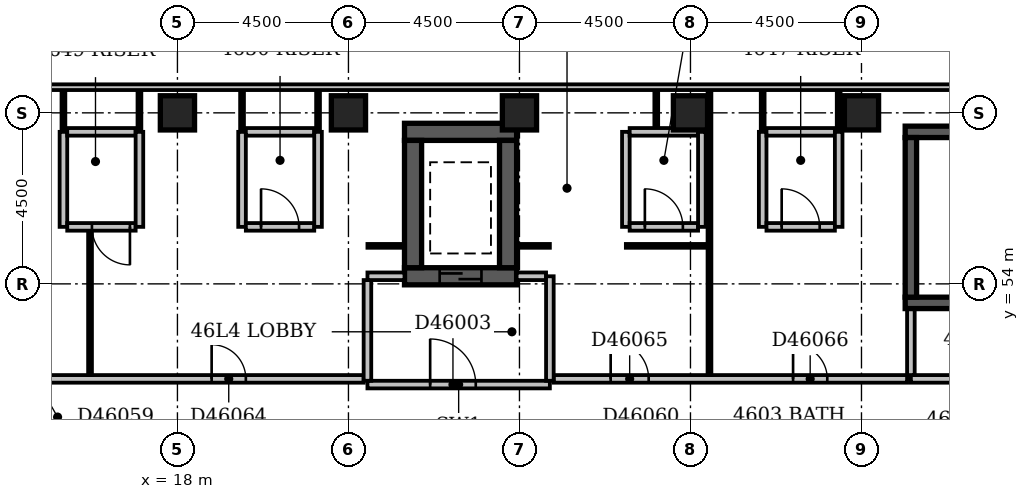
"""IFC4 building model, lengths in metres.
Left out: names, types, materials, properties, quantities, classifications, styles, units other than length and angle.
Written with IfcOpenShell. Run it as: python <this file> out.ifc"""

import sys

from ifc_helpers import new_model, si_unit, direction, frame, frame_2d, origin, origin_2d, place, context, subcontext, project, spatial, rectangle, extrude, element, fill, save


model = new_model("IFC4")
c1 = context("Model", 3, precision=1e-05, world=origin(), true_north=direction((0.0, 1.0)))
c2 = subcontext(c1, "Body", "Model", "MODEL_VIEW")
j1 = project(units=[si_unit("LENGTHUNIT", "METRE"), si_unit("PLANEANGLEUNIT", "RADIAN")], contexts=[c1])
p1 = place(None, origin())
s1 = spatial("IfcSite", under=j1, at=p1, CompositionType="ELEMENT")
p2 = place(p1, origin())
s2 = spatial("IfcBuilding", under=s1, at=p2, CompositionType="ELEMENT")
p3 = place(p2, frame((0.0, 0.0, 182.6)))
s3 = spatial("IfcBuildingStorey", under=s2, at=p3, CompositionType="ELEMENT", Elevation=182.6)
p4 = place(p3, frame((23.975, 54.2, -0.3), z_axis=(0.0, 0.0, 1.0), x_axis=(1.0, 0.0, 0.0)))
e1 = element("IfcWall", 1, at=p4, inside=s3, PredefinedType="SHEAR", context=c2, shape_type="SweptSolid", body=[
    extrude(rectangle(XDim=2.95, YDim=0.45, at=frame_2d((1.475, 0.0))), origin(), (0.0, 0.0, 1.0), 3.55),
])
p5 = place(p4, frame((0.925, 0.0, 0.3)))
e2 = element("IfcOpeningElement", 2, at=p5, cuts=e1, PredefinedType="OPENING", context=c2, shape_type="SweptSolid", body=[
    extrude(rectangle(XDim=1.1, YDim=2.1, at=frame_2d((0.55, 1.05))), frame((0.0, 0.237, 0.0), z_axis=(0.0, -1.0, 0.0), x_axis=(1.0, 0.0, 0.0)), (0.0, 0.0, 1.0), 0.474),
])
p6 = place(p3, frame((23.975, 58.0, -0.3), z_axis=(0.0, 0.0, 1.0), x_axis=(1.0, 0.0, 0.0)))
e3 = element("IfcWall", 3, at=p6, inside=s3, PredefinedType="SHEAR", context=c2, shape_type="SweptSolid", body=[
    extrude(rectangle(XDim=2.95, YDim=0.45, at=frame_2d((1.475, 0.0))), origin(), (0.0, 0.0, 1.0), 3.55),
])
for number, where, z_axis, x_axis in (
    (4, (24.2, 54.425, -0.3), (0.0, 0.0, 1.0), (0.0, 1.0, 0.0)),
    (5, (26.7, 54.425, -0.3), (0.0, 0.0, 1.0), (0.0, 1.0, 0.0)),
):
    element("IfcWall", number, at=place(p3, frame(where, z_axis=z_axis, x_axis=x_axis)), inside=s3, PredefinedType="SHEAR", context=c2, shape_type="SweptSolid", body=[
        extrude(rectangle(XDim=3.35, YDim=0.45, at=frame_2d((1.675, 0.0))), origin(), (0.0, 0.0, 1.0), 3.55),
    ])
p7 = place(p3, frame((37.15, 53.5, -0.3), z_axis=(0.0, 0.0, 1.0), x_axis=(1.0, 0.0, 0.0)))
e6 = element("IfcWall", 6, at=p7, inside=s3, PredefinedType="SHEAR", context=c2, shape_type="SweptSolid", body=[
    extrude(rectangle(XDim=7.0, YDim=0.3, at=frame_2d((3.5, 0.0))), origin(), (0.0, 0.0, 1.0), 3.55),
])
p8 = place(p7, frame((5.58, 0.0, 0.3)))
e7 = element("IfcOpeningElement", 7, at=p8, cuts=e6, PredefinedType="OPENING", context=c2, shape_type="SweptSolid", body=[
    extrude(rectangle(XDim=1.1, YDim=2.1, at=frame_2d((0.55, 1.05))), frame((0.0, 0.162, 0.0), z_axis=(0.0, -1.0, 0.0), x_axis=(1.0, 0.0, 0.0)), (0.0, 0.0, 1.0), 0.324),
])
p9 = place(p3, frame((37.15, 58.0, -0.3), z_axis=(0.0, 0.0, 1.0), x_axis=(1.0, 0.0, 0.0)))
e8 = element("IfcWall", 8, at=p9, inside=s3, PredefinedType="SHEAR", context=c2, shape_type="SweptSolid", body=[
    extrude(rectangle(XDim=7.4, YDim=0.3, at=frame_2d((3.7, 0.0))), origin(), (0.0, 0.0, 1.0), 3.55),
])
p10 = place(p3, frame((37.3, 53.65, -0.3), z_axis=(0.0, 0.0, 1.0), x_axis=(0.0, 1.0, 0.0)))
e9 = element("IfcWall", 9, at=p10, inside=s3, PredefinedType="SHEAR", context=c2, shape_type="SweptSolid", body=[
    extrude(rectangle(XDim=4.2, YDim=0.3, at=frame_2d((2.1, 0.0))), origin(), (0.0, 0.0, 1.0), 3.55),
])
for number, where, z_axis, x_axis in (
    (10, (18.0, 58.5, -0.3), (0.0, 0.0, 1.0), (1.0, 0.0, 0.0)),
    (11, (22.5, 58.5, -0.3), (0.0, 0.0, 1.0), (1.0, 0.0, 0.0)),
    (12, (27.0, 58.5, -0.3), (0.0, 0.0, 1.0), (1.0, 0.0, 0.0)),
    (13, (31.5, 58.5, -0.3), (0.0, 0.0, 1.0), (1.0, 0.0, 0.0)),
    (14, (36.0, 58.5, -0.3), (0.0, 0.0, 1.0), (1.0, 0.0, 0.0)),
):
    element("IfcColumn", number, at=place(p3, frame(where, z_axis=z_axis, x_axis=x_axis)), inside=s3, PredefinedType="COLUMN", context=c2, shape_type="SweptSolid", body=[
        extrude(rectangle(XDim=0.9, YDim=0.9, at=origin_2d()), origin(), (0.0, 0.0, 1.0), 3.55),
    ])
p11 = place(p3, frame((68.1, 59.175, 0.0), z_axis=(0.0, 0.0, 1.0), x_axis=(-1.0, 0.0, 0.0)))
e15 = element("IfcWall", 15, at=p11, inside=s3, PredefinedType="STANDARD", context=c2, shape_type="SweptSolid", body=[
    extrude(rectangle(XDim=68.85, YDim=0.15, at=frame_2d((34.425, 0.0))), origin(), (0.0, 0.0, 1.0), 2.7),
])
p12 = place(p3, frame((23.0, 51.35, 0.0), z_axis=(0.0, 0.0, 1.0), x_axis=(1.0, 0.0, 0.0)))
e16 = element("IfcWall", 16, at=p12, inside=s3, PredefinedType="PARTITIONING", context=c2, shape_type="SweptSolid", body=[
    extrude(rectangle(XDim=4.8, YDim=0.2, at=frame_2d((2.4, 0.0))), origin(), (0.0, 0.0, 1.0), 3.25),
])
p13 = place(p12, frame((1.65, 0.0, 0.0)))
e17 = element("IfcOpeningElement", 17, at=p13, cuts=e16, PredefinedType="OPENING", context=c2, shape_type="SweptSolid", body=[
    extrude(rectangle(XDim=1.2, YDim=2.1, at=frame_2d((0.6, 1.05))), frame((0.0, 0.112, 0.0), z_axis=(0.0, -1.0, 0.0), x_axis=(1.0, 0.0, 0.0)), (0.0, 0.0, 1.0), 0.224),
])
p14 = place(p3, frame((27.8, 51.45, 0.0), z_axis=(0.0, 0.0, 1.0), x_axis=(0.0, 1.0, 0.0)))
e18 = element("IfcWall", 18, at=p14, inside=s3, PredefinedType="PARTITIONING", context=c2, shape_type="SweptSolid", body=[
    extrude(rectangle(XDim=2.75, YDim=0.2, at=frame_2d((1.375, 0.0))), origin(), (0.0, 0.0, 1.0), 3.25),
])
p15 = place(p3, frame((23.0, 54.2, 0.0), z_axis=(0.0, 0.0, 1.0), x_axis=(1.0, 0.0, 0.0)))
e19 = element("IfcWall", 19, at=p15, inside=s3, PredefinedType="PARTITIONING", context=c2, shape_type="SweptSolid", body=[
    extrude(rectangle(XDim=0.975, YDim=0.2, at=frame_2d((0.488, 0.0))), origin(), (0.0, 0.0, 1.0), 3.25),
])
p16 = place(p3, frame((26.925, 54.2, 0.0), z_axis=(0.0, 0.0, 1.0), x_axis=(1.0, 0.0, 0.0)))
e20 = element("IfcWall", 20, at=p16, inside=s3, PredefinedType="PARTITIONING", context=c2, shape_type="SweptSolid", body=[
    extrude(rectangle(XDim=0.775, YDim=0.2, at=frame_2d((0.387, 0.0))), origin(), (0.0, 0.0, 1.0), 3.25),
])
p17 = place(p3, frame((23.0, 51.45, 0.0), z_axis=(0.0, 0.0, 1.0), x_axis=(0.0, 1.0, 0.0)))
e21 = element("IfcWall", 21, at=p17, inside=s3, PredefinedType="PARTITIONING", context=c2, shape_type="SweptSolid", body=[
    extrude(rectangle(XDim=2.65, YDim=0.2, at=frame_2d((1.325, 0.0))), origin(), (0.0, 0.0, 1.0), 3.25),
])
p18 = place(p3, frame((37.3, 51.5, 0.0), z_axis=(0.0, 0.0, 1.0), x_axis=(1.0, 0.0, 0.0)))
e22 = element("IfcWall", 22, at=p18, inside=s3, PredefinedType="PARTITIONING", context=c2, shape_type="SweptSolid", body=[
    extrude(rectangle(XDim=6.7, YDim=0.2, at=frame_2d((3.35, 0.0))), origin(), (0.0, 0.0, 1.0), 3.25),
])
p19 = place(p18, frame((2.75, 0.0, 0.0)))
e23 = element("IfcOpeningElement", 23, at=p19, cuts=e22, PredefinedType="OPENING", context=c2, shape_type="SweptSolid", body=[
    extrude(rectangle(XDim=1.2, YDim=2.1, at=frame_2d((0.6, 1.05))), frame((0.0, 0.112, 0.0), z_axis=(0.0, -1.0, 0.0), x_axis=(1.0, 0.0, 0.0)), (0.0, 0.0, 1.0), 0.224),
])
p20 = place(p3, frame((37.3, 51.6, 0.0), z_axis=(0.0, 0.0, 1.0), x_axis=(0.0, 1.0, 0.0)))
e24 = element("IfcWall", 24, at=p20, inside=s3, PredefinedType="PARTITIONING", context=c2, shape_type="SweptSolid", body=[
    extrude(rectangle(XDim=1.73, YDim=0.2, at=frame_2d((0.865, 0.0))), origin(), (0.0, 0.0, 1.0), 3.25),
])
p21 = place(p3, frame((7.6, 51.5, 0.0), z_axis=(0.0, 0.0, 1.0), x_axis=(1.0, 0.0, 0.0)))
e25 = element("IfcWall", 25, at=p21, inside=s3, PredefinedType="PARTITIONING", context=c2, shape_type="SweptSolid", body=[
    extrude(rectangle(XDim=15.3, YDim=0.2, at=frame_2d((7.65, 0.0))), origin(), (0.0, 0.0, 1.0), 3.25),
])
p22 = place(p21, frame((3.55, 0.0, 0.0)))
e26 = element("IfcOpeningElement", 26, at=p22, cuts=e25, PredefinedType="OPENING", context=c2, shape_type="SweptSolid", body=[
    extrude(rectangle(XDim=0.9, YDim=2.1, at=frame_2d((0.45, 1.05))), frame((0.0, 0.112, 0.0), z_axis=(0.0, -1.0, 0.0), x_axis=(1.0, 0.0, 0.0)), (0.0, 0.0, 1.0), 0.224),
])
p23 = place(p21, frame((11.3, 0.0, 0.0)))
e27 = element("IfcOpeningElement", 27, at=p23, cuts=e25, PredefinedType="OPENING", context=c2, shape_type="SweptSolid", body=[
    extrude(rectangle(XDim=0.9, YDim=2.1, at=frame_2d((0.45, 1.05))), frame((0.0, 0.112, 0.0), z_axis=(0.0, -1.0, 0.0), x_axis=(1.0, 0.0, 0.0)), (0.0, 0.0, 1.0), 0.224),
])
p24 = place(p3, frame((27.9, 51.5, 0.0), z_axis=(0.0, 0.0, 1.0), x_axis=(1.0, 0.0, 0.0)))
e28 = element("IfcWall", 28, at=p24, inside=s3, PredefinedType="PARTITIONING", context=c2, shape_type="SweptSolid", body=[
    extrude(rectangle(XDim=9.3, YDim=0.2, at=frame_2d((4.65, 0.0))), origin(), (0.0, 0.0, 1.0), 3.25),
])
p25 = place(p24, frame((1.5, 0.0, 0.0)))
e29 = element("IfcOpeningElement", 29, at=p25, cuts=e28, PredefinedType="OPENING", context=c2, shape_type="SweptSolid", body=[
    extrude(rectangle(XDim=1.0, YDim=2.1, at=frame_2d((0.5, 1.05))), frame((0.0, 0.112, 0.0), z_axis=(0.0, -1.0, 0.0), x_axis=(1.0, 0.0, 0.0)), (0.0, 0.0, 1.0), 0.224),
])
p26 = place(p24, frame((6.3, 0.0, 0.0)))
e30 = element("IfcOpeningElement", 30, at=p26, cuts=e28, PredefinedType="OPENING", context=c2, shape_type="SweptSolid", body=[
    extrude(rectangle(XDim=0.9, YDim=2.1, at=frame_2d((0.45, 1.05))), frame((0.0, 0.112, 0.0), z_axis=(0.0, -1.0, 0.0), x_axis=(1.0, 0.0, 0.0)), (0.0, 0.0, 1.0), 0.224),
])
p27 = place(p3, frame((15.7, 51.6, 0.0), z_axis=(0.0, 0.0, 1.0), x_axis=(0.0, 1.0, 0.0)))
e31 = element("IfcWall", 31, at=p27, inside=s3, PredefinedType="PARTITIONING", context=c2, shape_type="SweptSolid", body=[
    extrude(rectangle(XDim=3.8, YDim=0.1, at=frame_2d((1.9, 0.0))), origin(), (0.0, 0.0, 1.0), 3.25),
])
p28 = place(p3, frame((32.0, 51.6, 0.0), z_axis=(0.0, 0.0, 1.0), x_axis=(0.0, 1.0, 0.0)))
e32 = element("IfcWall", 32, at=p28, inside=s3, PredefinedType="PARTITIONING", context=c2, shape_type="SweptSolid", body=[
    extrude(rectangle(XDim=7.5, YDim=0.1, at=frame_2d((3.75, 0.0))), origin(), (0.0, 0.0, 1.0), 3.25),
])
p29 = place(p3, frame((23.0, 55.0, 0.0), z_axis=(0.0, 0.0, 1.0), x_axis=(1.0, 0.0, 0.0)))
e33 = element("IfcWall", 33, at=p29, inside=s3, PredefinedType="PARTITIONING", context=c2, shape_type="SweptSolid", body=[
    extrude(rectangle(XDim=0.975, YDim=0.1, at=frame_2d((0.488, 0.0))), origin(), (0.0, 0.0, 1.0), 3.25),
])
p30 = place(p3, frame((26.925, 55.0, 0.0), z_axis=(0.0, 0.0, 1.0), x_axis=(1.0, 0.0, 0.0)))
e34 = element("IfcWall", 34, at=p30, inside=s3, PredefinedType="PARTITIONING", context=c2, shape_type="SweptSolid", body=[
    extrude(rectangle(XDim=0.875, YDim=0.1, at=frame_2d((0.438, 0.0))), origin(), (0.0, 0.0, 1.0), 3.25),
])
p31 = place(p3, frame((29.8, 55.0, 0.0), z_axis=(0.0, 0.0, 1.0), x_axis=(1.0, 0.0, 0.0)))
e35 = element("IfcWall", 35, at=p31, inside=s3, PredefinedType="PARTITIONING", context=c2, shape_type="SweptSolid", body=[
    extrude(rectangle(XDim=2.15, YDim=0.1, at=frame_2d((1.075, 0.0))), origin(), (0.0, 0.0, 1.0), 3.25),
])
p32 = place(p3, frame((15.0, 55.5, 0.0), z_axis=(0.0, 0.0, 1.0), x_axis=(0.0, 1.0, 0.0)))
e36 = element("IfcWall", 36, at=p32, inside=s3, PredefinedType="PARTITIONING", context=c2, shape_type="SweptSolid", body=[
    extrude(rectangle(XDim=2.5, YDim=0.2, at=frame_2d((1.25, 0.0))), origin(), (0.0, 0.0, 1.0), 3.25),
])
p33 = place(p3, frame((15.1, 55.5, 0.0), z_axis=(0.0, 0.0, 1.0), x_axis=(1.0, 0.0, 0.0)))
e37 = element("IfcWall", 37, at=p33, inside=s3, PredefinedType="PARTITIONING", context=c2, shape_type="SweptSolid", body=[
    extrude(rectangle(XDim=1.8, YDim=0.2, at=frame_2d((0.9, 0.0))), origin(), (0.0, 0.0, 1.0), 3.25),
])
p34 = place(p33, frame((0.65, 0.0, 0.0)))
e38 = element("IfcOpeningElement", 38, at=p34, cuts=e37, PredefinedType="OPENING", context=c2, shape_type="SweptSolid", body=[
    extrude(rectangle(XDim=1.0, YDim=2.1, at=frame_2d((0.5, 1.05))), frame((0.0, 0.112, 0.0), z_axis=(0.0, -1.0, 0.0), x_axis=(1.0, 0.0, 0.0)), (0.0, 0.0, 1.0), 0.224),
])
for number, where, z_axis, x_axis in (
    (39, (17.0, 55.5, 0.0), (0.0, 0.0, 1.0), (0.0, 1.0, 0.0)),
    (40, (19.7, 55.5, 0.0), (0.0, 0.0, 1.0), (0.0, 1.0, 0.0)),
):
    element("IfcWall", number, at=place(p3, frame(where, z_axis=z_axis, x_axis=x_axis)), inside=s3, PredefinedType="PARTITIONING", context=c2, shape_type="SweptSolid", body=[
        extrude(rectangle(XDim=2.5, YDim=0.2, at=frame_2d((1.25, 0.0))), origin(), (0.0, 0.0, 1.0), 3.25),
    ])
p35 = place(p3, frame((19.8, 55.5, 0.0), z_axis=(0.0, 0.0, 1.0), x_axis=(1.0, 0.0, 0.0)))
e41 = element("IfcWall", 41, at=p35, inside=s3, PredefinedType="PARTITIONING", context=c2, shape_type="SweptSolid", body=[
    extrude(rectangle(XDim=1.8, YDim=0.2, at=frame_2d((0.9, 0.0))), origin(), (0.0, 0.0, 1.0), 3.25),
])
p36 = place(p35, frame((0.4, 0.0, 0.0)))
e42 = element("IfcOpeningElement", 42, at=p36, cuts=e41, PredefinedType="OPENING", context=c2, shape_type="SweptSolid", body=[
    extrude(rectangle(XDim=1.0, YDim=2.1, at=frame_2d((0.5, 1.05))), frame((0.0, 0.112, 0.0), z_axis=(0.0, -1.0, 0.0), x_axis=(1.0, 0.0, 0.0)), (0.0, 0.0, 1.0), 0.224),
])
for number, where, z_axis, x_axis in (
    (43, (21.7, 55.5, 0.0), (0.0, 0.0, 1.0), (0.0, 1.0, 0.0)),
    (44, (29.8, 55.5, 0.0), (0.0, 0.0, 1.0), (0.0, 1.0, 0.0)),
):
    element("IfcWall", number, at=place(p3, frame(where, z_axis=z_axis, x_axis=x_axis)), inside=s3, PredefinedType="PARTITIONING", context=c2, shape_type="SweptSolid", body=[
        extrude(rectangle(XDim=2.5, YDim=0.2, at=frame_2d((1.25, 0.0))), origin(), (0.0, 0.0, 1.0), 3.25),
    ])
p37 = place(p3, frame((29.9, 55.5, 0.0), z_axis=(0.0, 0.0, 1.0), x_axis=(1.0, 0.0, 0.0)))
e45 = element("IfcWall", 45, at=p37, inside=s3, PredefinedType="PARTITIONING", context=c2, shape_type="SweptSolid", body=[
    extrude(rectangle(XDim=1.8, YDim=0.2, at=frame_2d((0.9, 0.0))), origin(), (0.0, 0.0, 1.0), 3.25),
])
p38 = place(p37, frame((0.4, 0.0, 0.0)))
e46 = element("IfcOpeningElement", 46, at=p38, cuts=e45, PredefinedType="OPENING", context=c2, shape_type="SweptSolid", body=[
    extrude(rectangle(XDim=1.0, YDim=2.1, at=frame_2d((0.5, 1.05))), frame((0.0, 0.112, 0.0), z_axis=(0.0, -1.0, 0.0), x_axis=(1.0, 0.0, 0.0)), (0.0, 0.0, 1.0), 0.224),
])
for number, where, z_axis, x_axis in (
    (47, (31.8, 55.5, 0.0), (0.0, 0.0, 1.0), (0.0, 1.0, 0.0)),
    (48, (33.4, 55.5, 0.0), (0.0, 0.0, 1.0), (0.0, 1.0, 0.0)),
):
    element("IfcWall", number, at=place(p3, frame(where, z_axis=z_axis, x_axis=x_axis)), inside=s3, PredefinedType="PARTITIONING", context=c2, shape_type="SweptSolid", body=[
        extrude(rectangle(XDim=2.5, YDim=0.2, at=frame_2d((1.25, 0.0))), origin(), (0.0, 0.0, 1.0), 3.25),
    ])
p39 = place(p3, frame((33.5, 55.5, 0.0), z_axis=(0.0, 0.0, 1.0), x_axis=(1.0, 0.0, 0.0)))
e49 = element("IfcWall", 49, at=p39, inside=s3, PredefinedType="PARTITIONING", context=c2, shape_type="SweptSolid", body=[
    extrude(rectangle(XDim=1.8, YDim=0.2, at=frame_2d((0.9, 0.0))), origin(), (0.0, 0.0, 1.0), 3.25),
])
p40 = place(p39, frame((0.4, 0.0, 0.0)))
e50 = element("IfcOpeningElement", 50, at=p40, cuts=e49, PredefinedType="OPENING", context=c2, shape_type="SweptSolid", body=[
    extrude(rectangle(XDim=1.0, YDim=2.1, at=frame_2d((0.5, 1.05))), frame((0.0, 0.112, 0.0), z_axis=(0.0, -1.0, 0.0), x_axis=(1.0, 0.0, 0.0)), (0.0, 0.0, 1.0), 0.224),
])
p41 = place(p3, frame((35.4, 55.5, 0.0), z_axis=(0.0, 0.0, 1.0), x_axis=(0.0, 1.0, 0.0)))
e51 = element("IfcWall", 51, at=p41, inside=s3, PredefinedType="PARTITIONING", context=c2, shape_type="SweptSolid", body=[
    extrude(rectangle(XDim=2.5, YDim=0.2, at=frame_2d((1.25, 0.0))), origin(), (0.0, 0.0, 1.0), 2.35),
])
p42 = place(p3, frame((15.0, 58.0, 0.0), z_axis=(0.0, 0.0, 1.0), x_axis=(0.0, 1.0, 0.0)))
e52 = element("IfcWall", 52, at=p42, inside=s3, PredefinedType="PARTITIONING", context=c2, shape_type="SweptSolid", body=[
    extrude(rectangle(XDim=1.1, YDim=0.1, at=frame_2d((0.55, 0.0))), origin(), (0.0, 0.0, 1.0), 3.25),
])
p43 = place(p3, frame((15.1, 58.0, 0.0), z_axis=(0.0, 0.0, 1.0), x_axis=(1.0, 0.0, 0.0)))
e53 = element("IfcWall", 53, at=p43, inside=s3, PredefinedType="PARTITIONING", context=c2, shape_type="SweptSolid", body=[
    extrude(rectangle(XDim=1.8, YDim=0.2, at=frame_2d((0.9, 0.0))), origin(), (0.0, 0.0, 1.0), 3.25),
])
for number, where, z_axis, x_axis in (
    (54, (17.0, 58.0, 0.0), (0.0, 0.0, 1.0), (0.0, 1.0, 0.0)),
    (55, (19.7, 58.0, 0.0), (0.0, 0.0, 1.0), (0.0, 1.0, 0.0)),
):
    element("IfcWall", number, at=place(p3, frame(where, z_axis=z_axis, x_axis=x_axis)), inside=s3, PredefinedType="PARTITIONING", context=c2, shape_type="SweptSolid", body=[
        extrude(rectangle(XDim=1.1, YDim=0.1, at=frame_2d((0.55, 0.0))), origin(), (0.0, 0.0, 1.0), 3.25),
    ])
p44 = place(p3, frame((19.8, 58.0, 0.0), z_axis=(0.0, 0.0, 1.0), x_axis=(1.0, 0.0, 0.0)))
e56 = element("IfcWall", 56, at=p44, inside=s3, PredefinedType="PARTITIONING", context=c2, shape_type="SweptSolid", body=[
    extrude(rectangle(XDim=1.8, YDim=0.2, at=frame_2d((0.9, 0.0))), origin(), (0.0, 0.0, 1.0), 3.25),
])
p45 = place(p3, frame((21.7, 58.0, 0.0), z_axis=(0.0, 0.0, 1.0), x_axis=(0.0, 1.0, 0.0)))
e57 = element("IfcWall", 57, at=p45, inside=s3, PredefinedType="PARTITIONING", context=c2, shape_type="SweptSolid", body=[
    extrude(rectangle(XDim=1.1, YDim=0.1, at=frame_2d((0.55, 0.0))), origin(), (0.0, 0.0, 1.0), 3.25),
])
p46 = place(p3, frame((29.9, 58.0, 0.0), z_axis=(0.0, 0.0, 1.0), x_axis=(1.0, 0.0, 0.0)))
e58 = element("IfcWall", 58, at=p46, inside=s3, PredefinedType="PARTITIONING", context=c2, shape_type="SweptSolid", body=[
    extrude(rectangle(XDim=1.8, YDim=0.2, at=frame_2d((0.9, 0.0))), origin(), (0.0, 0.0, 1.0), 3.25),
])
p47 = place(p3, frame((33.4, 58.0, 0.0), z_axis=(0.0, 0.0, 1.0), x_axis=(0.0, 1.0, 0.0)))
e59 = element("IfcWall", 59, at=p47, inside=s3, PredefinedType="PARTITIONING", context=c2, shape_type="SweptSolid", body=[
    extrude(rectangle(XDim=1.1, YDim=0.1, at=frame_2d((0.55, 0.0))), origin(), (0.0, 0.0, 1.0), 3.25),
])
p48 = place(p3, frame((33.5, 58.0, 0.0), z_axis=(0.0, 0.0, 1.0), x_axis=(1.0, 0.0, 0.0)))
e60 = element("IfcWall", 60, at=p48, inside=s3, PredefinedType="PARTITIONING", context=c2, shape_type="SweptSolid", body=[
    extrude(rectangle(XDim=1.8, YDim=0.2, at=frame_2d((0.9, 0.0))), origin(), (0.0, 0.0, 1.0), 3.25),
])
p49 = place(p3, frame((35.4, 58.0, 0.0), z_axis=(0.0, 0.0, 1.0), x_axis=(0.0, 1.0, 0.0)))
e61 = element("IfcWall", 61, at=p49, inside=s3, PredefinedType="PARTITIONING", context=c2, shape_type="SweptSolid", body=[
    extrude(rectangle(XDim=1.1, YDim=0.1, at=frame_2d((0.55, 0.0))), origin(), (0.0, 0.0, 1.0), 2.35),
])
p50 = place(p3, frame((30.6, 58.1, 0.0), z_axis=(0.0, 0.0, 1.0), x_axis=(0.0, 1.0, 0.0)))
e62 = element("IfcWall", 62, at=p50, inside=s3, PredefinedType="PARTITIONING", context=c2, shape_type="SweptSolid", body=[
    extrude(rectangle(XDim=1.0, YDim=0.1, at=frame_2d((0.5, 0.0))), origin(), (0.0, 0.0, 1.0), 3.25),
])
p51 = place(p13, origin())
e63 = element("IfcDoor", 63, at=p51, inside=s3, OperationType="SINGLE_SWING_LEFT", PredefinedType="DOOR", context=c2, shape_type="SweptSolid", body=[
    extrude(rectangle(XDim=1.2, YDim=2.1, at=frame_2d((0.6, 1.05))), frame((0.0, 0.025, 0.0), z_axis=(0.0, -1.0, 0.0), x_axis=(1.0, 0.0, 0.0)), (0.0, 0.0, 1.0), 0.05),
])
fill(e17, e63)
p52 = place(p5, origin())
e64 = element("IfcDoor", 64, at=p52, inside=s3, OperationType="SLIDING_TO_LEFT", PredefinedType="DOOR", context=c2, shape_type="SweptSolid", body=[
    extrude(rectangle(XDim=1.1, YDim=2.1, at=frame_2d((0.55, 1.05))), frame((0.0, 0.025, 0.0), z_axis=(0.0, -1.0, 0.0), x_axis=(1.0, 0.0, 0.0)), (0.0, 0.0, 1.0), 0.05),
])
fill(e2, e64)
p53 = place(p23, origin())
e65 = element("IfcDoor", 65, at=p53, inside=s3, OperationType="SINGLE_SWING_LEFT", PredefinedType="DOOR", context=c2, shape_type="SweptSolid", body=[
    extrude(rectangle(XDim=0.9, YDim=2.1, at=frame_2d((0.45, 1.05))), frame((0.0, 0.025, 0.0), z_axis=(0.0, -1.0, 0.0), x_axis=(1.0, 0.0, 0.0)), (0.0, 0.0, 1.0), 0.05),
])
fill(e27, e65)
p54 = place(p25, origin())
e66 = element("IfcDoor", 66, at=p54, inside=s3, OperationType="SINGLE_SWING_LEFT", PredefinedType="DOOR", context=c2, shape_type="SweptSolid", body=[
    extrude(rectangle(XDim=1.0, YDim=2.1, at=frame_2d((0.5, 1.05))), frame((0.0, 0.025, 0.0), z_axis=(0.0, -1.0, 0.0), x_axis=(1.0, 0.0, 0.0)), (0.0, 0.0, 1.0), 0.05),
])
fill(e29, e66)
p55 = place(p26, origin())
e67 = element("IfcDoor", 67, at=p55, inside=s3, OperationType="SINGLE_SWING_LEFT", PredefinedType="DOOR", context=c2, shape_type="SweptSolid", body=[
    extrude(rectangle(XDim=0.9, YDim=2.1, at=frame_2d((0.45, 1.05))), frame((0.0, 0.025, 0.0), z_axis=(0.0, -1.0, 0.0), x_axis=(1.0, 0.0, 0.0)), (0.0, 0.0, 1.0), 0.05),
])
fill(e30, e67)
p56 = place(p34, origin())
e68 = element("IfcDoor", 68, at=p56, inside=s3, OperationType="SINGLE_SWING_RIGHT", PredefinedType="DOOR", context=c2, shape_type="SweptSolid", body=[
    extrude(rectangle(XDim=1.0, YDim=2.1, at=frame_2d((0.5, 1.05))), frame((0.0, 0.025, 0.0), z_axis=(0.0, -1.0, 0.0), x_axis=(1.0, 0.0, 0.0)), (0.0, 0.0, 1.0), 0.05),
])
fill(e38, e68)
p57 = place(p36, origin())
e69 = element("IfcDoor", 69, at=p57, inside=s3, OperationType="SINGLE_SWING_LEFT", PredefinedType="DOOR", context=c2, shape_type="SweptSolid", body=[
    extrude(rectangle(XDim=1.0, YDim=2.1, at=frame_2d((0.5, 1.05))), frame((0.0, 0.025, 0.0), z_axis=(0.0, -1.0, 0.0), x_axis=(1.0, 0.0, 0.0)), (0.0, 0.0, 1.0), 0.05),
])
fill(e42, e69)
p58 = place(p38, origin())
e70 = element("IfcDoor", 70, at=p58, inside=s3, OperationType="SINGLE_SWING_LEFT", PredefinedType="DOOR", context=c2, shape_type="SweptSolid", body=[
    extrude(rectangle(XDim=1.0, YDim=2.1, at=frame_2d((0.5, 1.05))), frame((0.0, 0.025, 0.0), z_axis=(0.0, -1.0, 0.0), x_axis=(1.0, 0.0, 0.0)), (0.0, 0.0, 1.0), 0.05),
])
fill(e46, e70)
p59 = place(p40, origin())
e71 = element("IfcDoor", 71, at=p59, inside=s3, OperationType="SINGLE_SWING_LEFT", PredefinedType="DOOR", context=c2, shape_type="SweptSolid", body=[
    extrude(rectangle(XDim=1.0, YDim=2.1, at=frame_2d((0.5, 1.05))), frame((0.0, 0.025, 0.0), z_axis=(0.0, -1.0, 0.0), x_axis=(1.0, 0.0, 0.0)), (0.0, 0.0, 1.0), 0.05),
])
fill(e50, e71)
save(model, sys.argv[1])
